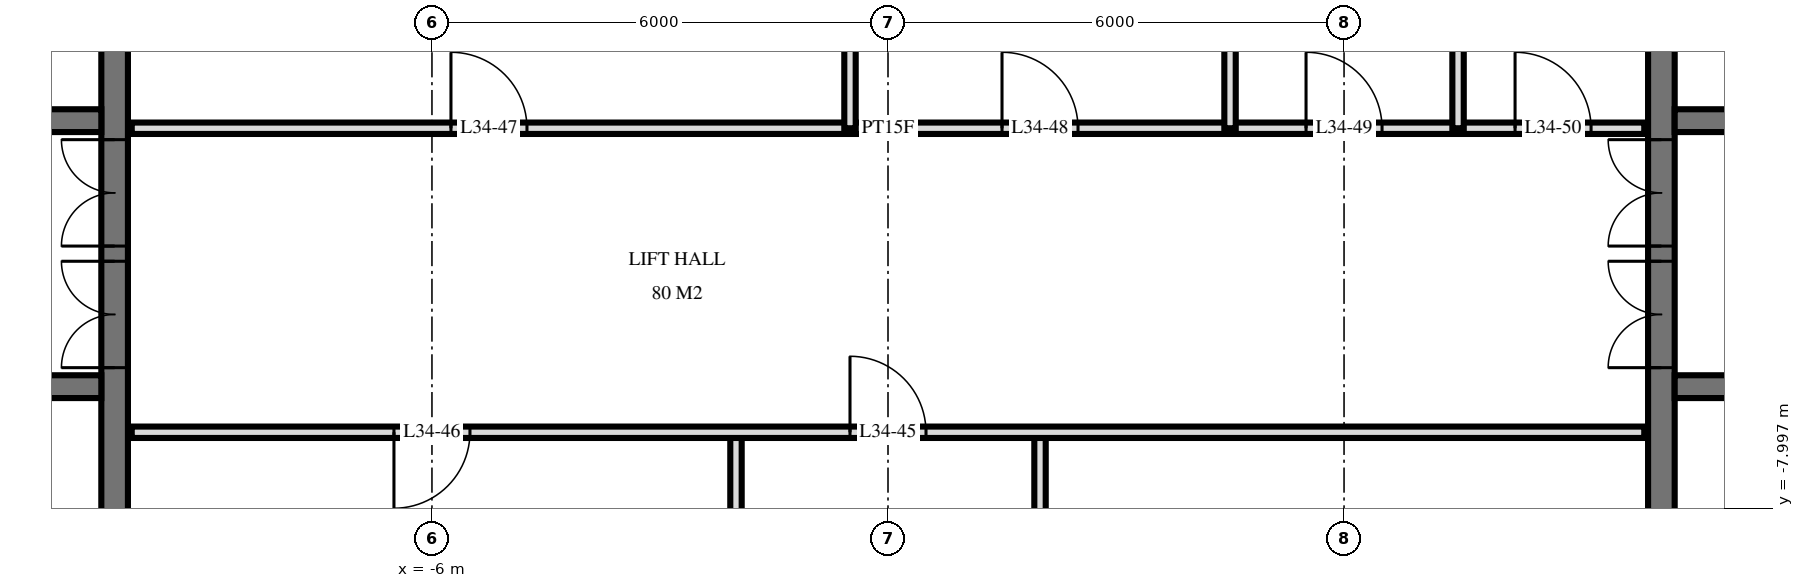
"""IFC4 building model, lengths in metres.
Left out: names, types, materials, properties, quantities, classifications, styles, units other than length and angle.
Written with IfcOpenShell. Run it as: python <this file> out.ifc"""

import sys

from ifc_helpers import new_model, si_unit, direction, frame, frame_2d, origin, place, context, subcontext, project, spatial, rectangle, extrude, element, fill, save


model = new_model("IFC4")
c1 = context("Model", 3, precision=1e-05, world=origin(), true_north=direction((0.0, 1.0)))
c2 = subcontext(c1, "Body", "Model", "MODEL_VIEW")
j1 = project(units=[si_unit("LENGTHUNIT", "METRE"), si_unit("PLANEANGLEUNIT", "RADIAN")], contexts=[c1])
p1 = place(None, origin())
s1 = spatial("IfcSite", under=j1, at=p1, CompositionType="ELEMENT")
p2 = place(p1, origin())
s2 = spatial("IfcBuilding", under=s1, at=p2, CompositionType="ELEMENT")
p3 = place(p2, frame((0.0, 0.0, 134.4)))
s3 = spatial("IfcBuildingStorey", under=s2, at=p3, CompositionType="ELEMENT", Elevation=134.4)
p4 = place(p3, frame((-10.175, -14.55, 0.0), z_axis=(0.0, 0.0, 1.0), x_axis=(0.0, 1.0, 0.0)))
e1 = element("IfcWall", 1, at=p4, inside=s3, PredefinedType="SHEAR", context=c2, shape_type="SweptSolid", body=[
    extrude(rectangle(XDim=14.1, YDim=0.35, at=frame_2d((7.05, 0.0))), origin(), (0.0, 0.0, 1.0), 3.6),
])
p5 = place(p4, frame((8.4, 0.0, 0.0)))
e2 = element("IfcOpeningElement", 2, at=p5, cuts=e1, PredefinedType="OPENING", context=c2, shape_type="SweptSolid", body=[
    extrude(rectangle(XDim=1.4, YDim=2.4, at=frame_2d((0.7, 1.2))), frame((0.0, 0.185, 0.0), z_axis=(0.0, -1.0, 0.0), x_axis=(1.0, 0.0, 0.0)), (0.0, 0.0, 1.0), 0.37),
])
p6 = place(p4, frame((10.0, 0.0, 0.0)))
e3 = element("IfcOpeningElement", 3, at=p6, cuts=e1, PredefinedType="OPENING", context=c2, shape_type="SweptSolid", body=[
    extrude(rectangle(XDim=1.4, YDim=2.4, at=frame_2d((0.7, 1.2))), frame((0.0, 0.185, 0.0), z_axis=(0.0, -1.0, 0.0), x_axis=(1.0, 0.0, 0.0)), (0.0, 0.0, 1.0), 0.37),
])
p7 = place(p4, frame((4.0, 0.0, 0.0)))
e4 = element("IfcOpeningElement", 4, at=p7, cuts=e1, PredefinedType="OPENING", context=c2, shape_type="SweptSolid", body=[
    extrude(rectangle(XDim=1.2, YDim=2.1, at=frame_2d((0.6, 1.05))), frame((0.0, 0.185, 0.0), z_axis=(0.0, -1.0, 0.0), x_axis=(1.0, 0.0, 0.0)), (0.0, 0.0, 1.0), 0.37),
])
p8 = place(p3, frame((-24.05, -2.9, 0.0), z_axis=(0.0, 0.0, 1.0), x_axis=(1.0, 0.0, 0.0)))
e5 = element("IfcWall", 5, at=p8, inside=s3, PredefinedType="SHEAR", context=c2, shape_type="SweptSolid", body=[
    extrude(rectangle(XDim=13.7, YDim=0.3, at=frame_2d((6.85, 0.0))), origin(), (0.0, 0.0, 1.0), 3.6),
])
p9 = place(p8, frame((0.55, 0.0, 0.0)))
e6 = element("IfcOpeningElement", 6, at=p9, cuts=e5, PredefinedType="OPENING", context=c2, shape_type="SweptSolid", body=[
    extrude(rectangle(XDim=1.1, YDim=2.1, at=frame_2d((0.55, 1.05))), frame((0.0, 0.16, 0.0), z_axis=(0.0, -1.0, 0.0), x_axis=(1.0, 0.0, 0.0)), (0.0, 0.0, 1.0), 0.32),
])
p10 = place(p8, frame((5.9, 0.0, 0.0)))
e7 = element("IfcOpeningElement", 7, at=p10, cuts=e5, PredefinedType="OPENING", context=c2, shape_type="SweptSolid", body=[
    extrude(rectangle(XDim=0.9, YDim=2.1, at=frame_2d((0.45, 1.05))), frame((0.0, 0.16, 0.0), z_axis=(0.0, -1.0, 0.0), x_axis=(1.0, 0.0, 0.0)), (0.0, 0.0, 1.0), 0.32),
])
p11 = place(p8, frame((11.85, 0.0, 0.0)))
e8 = element("IfcOpeningElement", 8, at=p11, cuts=e5, PredefinedType="OPENING", context=c2, shape_type="SweptSolid", body=[
    extrude(rectangle(XDim=1.0, YDim=2.1, at=frame_2d((0.5, 1.05))), frame((0.0, 0.16, 0.0), z_axis=(0.0, -1.0, 0.0), x_axis=(1.0, 0.0, 0.0)), (0.0, 0.0, 1.0), 0.32),
])
p12 = place(p8, frame((9.312, 0.0, 0.0)))
e9 = element("IfcOpeningElement", 9, at=p12, cuts=e5, PredefinedType="OPENING", context=c2, shape_type="SweptSolid", body=[
    extrude(rectangle(XDim=1.0, YDim=2.1, at=frame_2d((0.5, 1.05))), frame((0.0, 0.16, 0.0), z_axis=(0.0, -1.0, 0.0), x_axis=(1.0, 0.0, 0.0)), (0.0, 0.0, 1.0), 0.32),
])
p13 = place(p8, frame((7.887, 0.0, 0.0)))
e10 = element("IfcOpeningElement", 10, at=p13, cuts=e5, PredefinedType="OPENING", context=c2, shape_type="SweptSolid", body=[
    extrude(rectangle(XDim=1.0, YDim=2.1, at=frame_2d((0.5, 1.05))), frame((0.0, 0.16, 0.0), z_axis=(0.0, -1.0, 0.0), x_axis=(1.0, 0.0, 0.0)), (0.0, 0.0, 1.0), 0.32),
])
p14 = place(p8, frame((3.0, 0.0, 0.0)))
e11 = element("IfcOpeningElement", 11, at=p14, cuts=e5, PredefinedType="OPENING", context=c2, shape_type="SweptSolid", body=[
    extrude(rectangle(XDim=1.0, YDim=2.1, at=frame_2d((0.5, 1.05))), frame((0.0, 0.16, 0.0), z_axis=(0.0, -1.0, 0.0), x_axis=(1.0, 0.0, 0.0)), (0.0, 0.0, 1.0), 0.32),
])
p15 = place(p3, frame((-24.05, -6.4, 0.0), z_axis=(0.0, 0.0, 1.0), x_axis=(1.0, 0.0, 0.0)))
e12 = element("IfcWall", 12, at=p15, inside=s3, PredefinedType="SHEAR", context=c2, shape_type="SweptSolid", body=[
    extrude(rectangle(XDim=13.7, YDim=0.3, at=frame_2d((6.85, 0.0))), origin(), (0.0, 0.0, 1.0), 3.6),
])
p16 = place(p15, frame((0.55, 0.0, 0.0)))
e13 = element("IfcOpeningElement", 13, at=p16, cuts=e12, PredefinedType="OPENING", context=c2, shape_type="SweptSolid", body=[
    extrude(rectangle(XDim=1.1, YDim=2.1, at=frame_2d((0.55, 1.05))), frame((0.0, 0.16, 0.0), z_axis=(0.0, -1.0, 0.0), x_axis=(1.0, 0.0, 0.0)), (0.0, 0.0, 1.0), 0.32),
])
p17 = place(p15, frame((5.8, 0.0, 0.0)))
e14 = element("IfcOpeningElement", 14, at=p17, cuts=e12, PredefinedType="OPENING", context=c2, shape_type="SweptSolid", body=[
    extrude(rectangle(XDim=1.1, YDim=2.1, at=frame_2d((0.55, 1.05))), frame((0.0, 0.16, 0.0), z_axis=(0.0, -1.0, 0.0), x_axis=(1.0, 0.0, 0.0)), (0.0, 0.0, 1.0), 0.32),
])
p18 = place(p3, frame((10.175, -14.55, 0.0), z_axis=(0.0, 0.0, 1.0), x_axis=(0.0, 1.0, 0.0)))
e15 = element("IfcWall", 15, at=p18, inside=s3, PredefinedType="SHEAR", context=c2, shape_type="SweptSolid", body=[
    extrude(rectangle(XDim=14.1, YDim=0.35, at=frame_2d((7.05, 0.0))), origin(), (0.0, 0.0, 1.0), 3.6),
])
p19 = place(p18, frame((8.4, 0.0, 0.0)))
e16 = element("IfcOpeningElement", 16, at=p19, cuts=e15, PredefinedType="OPENING", context=c2, shape_type="SweptSolid", body=[
    extrude(rectangle(XDim=1.4, YDim=2.4, at=frame_2d((0.7, 1.2))), frame((0.0, 0.185, 0.0), z_axis=(0.0, -1.0, 0.0), x_axis=(1.0, 0.0, 0.0)), (0.0, 0.0, 1.0), 0.37),
])
p20 = place(p18, frame((10.0, 0.0, 0.0)))
e17 = element("IfcOpeningElement", 17, at=p20, cuts=e15, PredefinedType="OPENING", context=c2, shape_type="SweptSolid", body=[
    extrude(rectangle(XDim=1.4, YDim=2.4, at=frame_2d((0.7, 1.2))), frame((0.0, 0.185, 0.0), z_axis=(0.0, -1.0, 0.0), x_axis=(1.0, 0.0, 0.0)), (0.0, 0.0, 1.0), 0.37),
])
p21 = place(p18, frame((4.0, 0.0, 0.0)))
e18 = element("IfcOpeningElement", 18, at=p21, cuts=e15, PredefinedType="OPENING", context=c2, shape_type="SweptSolid", body=[
    extrude(rectangle(XDim=1.2, YDim=2.1, at=frame_2d((0.6, 1.05))), frame((0.0, 0.185, 0.0), z_axis=(0.0, -1.0, 0.0), x_axis=(1.0, 0.0, 0.0)), (0.0, 0.0, 1.0), 0.37),
])
p22 = place(p3, frame((10.35, -2.9, 0.0), z_axis=(0.0, 0.0, 1.0), x_axis=(1.0, 0.0, 0.0)))
e19 = element("IfcWall", 19, at=p22, inside=s3, PredefinedType="SHEAR", context=c2, shape_type="SweptSolid", body=[
    extrude(rectangle(XDim=13.7, YDim=0.3, at=frame_2d((6.85, 0.0))), origin(), (0.0, 0.0, 1.0), 3.6),
])
p23 = place(p22, frame((12.05, 0.0, 0.0)))
e20 = element("IfcOpeningElement", 20, at=p23, cuts=e19, PredefinedType="OPENING", context=c2, shape_type="SweptSolid", body=[
    extrude(rectangle(XDim=1.1, YDim=2.1, at=frame_2d((0.55, 1.05))), frame((0.0, 0.16, 0.0), z_axis=(0.0, -1.0, 0.0), x_axis=(1.0, 0.0, 0.0)), (0.0, 0.0, 1.0), 0.32),
])
p24 = place(p22, frame((6.9, 0.0, 0.0)))
e21 = element("IfcOpeningElement", 21, at=p24, cuts=e19, PredefinedType="OPENING", context=c2, shape_type="SweptSolid", body=[
    extrude(rectangle(XDim=0.9, YDim=2.1, at=frame_2d((0.45, 1.05))), frame((0.0, 0.16, 0.0), z_axis=(0.0, -1.0, 0.0), x_axis=(1.0, 0.0, 0.0)), (0.0, 0.0, 1.0), 0.32),
])
p25 = place(p22, frame((0.85, 0.0, 0.0)))
e22 = element("IfcOpeningElement", 22, at=p25, cuts=e19, PredefinedType="OPENING", context=c2, shape_type="SweptSolid", body=[
    extrude(rectangle(XDim=1.0, YDim=2.1, at=frame_2d((0.5, 1.05))), frame((0.0, 0.16, 0.0), z_axis=(0.0, -1.0, 0.0), x_axis=(1.0, 0.0, 0.0)), (0.0, 0.0, 1.0), 0.32),
])
p26 = place(p22, frame((3.387, 0.0, 0.0)))
e23 = element("IfcOpeningElement", 23, at=p26, cuts=e19, PredefinedType="OPENING", context=c2, shape_type="SweptSolid", body=[
    extrude(rectangle(XDim=1.0, YDim=2.1, at=frame_2d((0.5, 1.05))), frame((0.0, 0.16, 0.0), z_axis=(0.0, -1.0, 0.0), x_axis=(1.0, 0.0, 0.0)), (0.0, 0.0, 1.0), 0.32),
])
p27 = place(p22, frame((4.812, 0.0, 0.0)))
e24 = element("IfcOpeningElement", 24, at=p27, cuts=e19, PredefinedType="OPENING", context=c2, shape_type="SweptSolid", body=[
    extrude(rectangle(XDim=1.0, YDim=2.1, at=frame_2d((0.5, 1.05))), frame((0.0, 0.16, 0.0), z_axis=(0.0, -1.0, 0.0), x_axis=(1.0, 0.0, 0.0)), (0.0, 0.0, 1.0), 0.32),
])
p28 = place(p22, frame((9.7, 0.0, 0.0)))
e25 = element("IfcOpeningElement", 25, at=p28, cuts=e19, PredefinedType="OPENING", context=c2, shape_type="SweptSolid", body=[
    extrude(rectangle(XDim=1.0, YDim=2.1, at=frame_2d((0.5, 1.05))), frame((0.0, 0.16, 0.0), z_axis=(0.0, -1.0, 0.0), x_axis=(1.0, 0.0, 0.0)), (0.0, 0.0, 1.0), 0.32),
])
p29 = place(p3, frame((10.35, -6.4, 0.0), z_axis=(0.0, 0.0, 1.0), x_axis=(1.0, 0.0, 0.0)))
e26 = element("IfcWall", 26, at=p29, inside=s3, PredefinedType="SHEAR", context=c2, shape_type="SweptSolid", body=[
    extrude(rectangle(XDim=13.7, YDim=0.3, at=frame_2d((6.85, 0.0))), origin(), (0.0, 0.0, 1.0), 3.6),
])
p30 = place(p29, frame((12.05, 0.0, 0.0)))
e27 = element("IfcOpeningElement", 27, at=p30, cuts=e26, PredefinedType="OPENING", context=c2, shape_type="SweptSolid", body=[
    extrude(rectangle(XDim=1.1, YDim=2.1, at=frame_2d((0.55, 1.05))), frame((0.0, 0.16, 0.0), z_axis=(0.0, -1.0, 0.0), x_axis=(1.0, 0.0, 0.0)), (0.0, 0.0, 1.0), 0.32),
])
p31 = place(p29, frame((6.8, 0.0, 0.0)))
e28 = element("IfcOpeningElement", 28, at=p31, cuts=e26, PredefinedType="OPENING", context=c2, shape_type="SweptSolid", body=[
    extrude(rectangle(XDim=1.1, YDim=2.1, at=frame_2d((0.55, 1.05))), frame((0.0, 0.16, 0.0), z_axis=(0.0, -1.0, 0.0), x_axis=(1.0, 0.0, 0.0)), (0.0, 0.0, 1.0), 0.32),
])
for number, where, z_axis, x_axis in (
    (29, (7.5, -3.0, 0.0), (0.0, 0.0, 1.0), (0.0, 1.0, 0.0)),
    (30, (4.5, -3.0, 0.0), (0.0, 0.0, 1.0), (0.0, 1.0, 0.0)),
):
    element("IfcWall", number, at=place(p3, frame(where, z_axis=z_axis, x_axis=x_axis)), inside=s3, PredefinedType="PLUMBINGWALL", context=c2, shape_type="SweptSolid", body=[
        extrude(rectangle(XDim=4.02, YDim=0.15, at=frame_2d((2.01, 0.0))), origin(), (0.0, 0.0, 1.0), 3.32),
    ])
p32 = place(p3, frame((2.0, -11.0, 0.0), z_axis=(0.0, 0.0, 1.0), x_axis=(0.0, 1.0, 0.0)))
e31 = element("IfcWall", 31, at=p32, inside=s3, PredefinedType="PARTITIONING", context=c2, shape_type="SweptSolid", body=[
    extrude(rectangle(XDim=4.0, YDim=0.15, at=frame_2d((2.0, 0.0))), origin(), (0.0, 0.0, 1.0), 3.32),
])
p33 = place(p3, frame((-0.5, -3.0, 0.0), z_axis=(0.0, 0.0, 1.0), x_axis=(0.0, 1.0, 0.0)))
e32 = element("IfcWall", 32, at=p33, inside=s3, PredefinedType="PARTITIONING", context=c2, shape_type="SweptSolid", body=[
    extrude(rectangle(XDim=4.02, YDim=0.15, at=frame_2d((2.01, 0.0))), origin(), (0.0, 0.0, 1.0), 3.32),
])
p34 = place(p3, frame((-2.0, -11.0, 0.0), z_axis=(0.0, 0.0, 1.0), x_axis=(0.0, 1.0, 0.0)))
e33 = element("IfcWall", 33, at=p34, inside=s3, PredefinedType="PARTITIONING", context=c2, shape_type="SweptSolid", body=[
    extrude(rectangle(XDim=4.0, YDim=0.15, at=frame_2d((2.0, 0.0))), origin(), (0.0, 0.0, 1.0), 3.32),
])
p35 = place(p3, frame((-9.95, -7.0, 0.0), z_axis=(0.0, 0.0, 1.0), x_axis=(1.0, 0.0, 0.0)))
e34 = element("IfcWall", 34, at=p35, inside=s3, PredefinedType="PARTITIONING", context=c2, shape_type="SweptSolid", body=[
    extrude(rectangle(XDim=19.9, YDim=0.15, at=frame_2d((9.95, 0.0))), origin(), (0.0, 0.0, 1.0), 3.32),
])
p36 = place(p35, frame((9.45, 0.0, 0.0)))
e35 = element("IfcOpeningElement", 35, at=p36, cuts=e34, PredefinedType="OPENING", context=c2, shape_type="SweptSolid", body=[
    extrude(rectangle(XDim=1.0, YDim=2.1, at=frame_2d((0.5, 1.05))), frame((0.0, 0.085, 0.0), z_axis=(0.0, -1.0, 0.0), x_axis=(1.0, 0.0, 0.0)), (0.0, 0.0, 1.0), 0.17),
])
p37 = place(p35, frame((3.45, 0.0, 0.0)))
e36 = element("IfcOpeningElement", 36, at=p37, cuts=e34, PredefinedType="OPENING", context=c2, shape_type="SweptSolid", body=[
    extrude(rectangle(XDim=1.0, YDim=2.1, at=frame_2d((0.5, 1.05))), frame((0.0, 0.085, 0.0), z_axis=(0.0, -1.0, 0.0), x_axis=(1.0, 0.0, 0.0)), (0.0, 0.0, 1.0), 0.17),
])
p38 = place(p3, frame((-9.95, -3.0, 0.0), z_axis=(0.0, 0.0, 1.0), x_axis=(1.0, 0.0, 0.0)))
e37 = element("IfcWall", 37, at=p38, inside=s3, PredefinedType="PARTITIONING", context=c2, shape_type="SweptSolid", body=[
    extrude(rectangle(XDim=19.9, YDim=0.15, at=frame_2d((9.95, 0.0))), origin(), (0.0, 0.0, 1.0), 3.32),
])
p39 = place(p38, frame((4.2, 0.0, 0.0)))
e38 = element("IfcOpeningElement", 38, at=p39, cuts=e37, PredefinedType="OPENING", context=c2, shape_type="SweptSolid", body=[
    extrude(rectangle(XDim=1.0, YDim=2.1, at=frame_2d((0.5, 1.05))), frame((0.0, 0.085, 0.0), z_axis=(0.0, -1.0, 0.0), x_axis=(1.0, 0.0, 0.0)), (0.0, 0.0, 1.0), 0.17),
])
p40 = place(p38, frame((11.45, 0.0, 0.0)))
e39 = element("IfcOpeningElement", 39, at=p40, cuts=e37, PredefinedType="OPENING", context=c2, shape_type="SweptSolid", body=[
    extrude(rectangle(XDim=1.0, YDim=2.1, at=frame_2d((0.5, 1.05))), frame((0.0, 0.085, 0.0), z_axis=(0.0, -1.0, 0.0), x_axis=(1.0, 0.0, 0.0)), (0.0, 0.0, 1.0), 0.17),
])
p41 = place(p38, frame((15.45, 0.0, 0.0)))
e40 = element("IfcOpeningElement", 40, at=p41, cuts=e37, PredefinedType="OPENING", context=c2, shape_type="SweptSolid", body=[
    extrude(rectangle(XDim=1.0, YDim=2.1, at=frame_2d((0.5, 1.05))), frame((0.0, 0.085, 0.0), z_axis=(0.0, -1.0, 0.0), x_axis=(1.0, 0.0, 0.0)), (0.0, 0.0, 1.0), 0.17),
])
p42 = place(p38, frame((18.2, 0.0, 0.0)))
e41 = element("IfcOpeningElement", 41, at=p42, cuts=e37, PredefinedType="OPENING", context=c2, shape_type="SweptSolid", body=[
    extrude(rectangle(XDim=1.0, YDim=2.1, at=frame_2d((0.5, 1.05))), frame((0.0, 0.085, 0.0), z_axis=(0.0, -1.0, 0.0), x_axis=(1.0, 0.0, 0.0)), (0.0, 0.0, 1.0), 0.17),
])
p43 = place(p5, origin())
e42 = element("IfcDoor", 42, at=p43, inside=s3, OperationType="DOUBLE_DOOR_SINGLE_SWING", PredefinedType="DOOR", context=c2, shape_type="SweptSolid", body=[
    extrude(rectangle(XDim=1.4, YDim=2.4, at=frame_2d((0.7, 1.2))), frame((0.0, 0.025, 0.0), z_axis=(0.0, -1.0, 0.0), x_axis=(1.0, 0.0, 0.0)), (0.0, 0.0, 1.0), 0.05),
])
fill(e2, e42)
p44 = place(p6, origin())
e43 = element("IfcDoor", 43, at=p44, inside=s3, OperationType="DOUBLE_DOOR_SINGLE_SWING", PredefinedType="DOOR", context=c2, shape_type="SweptSolid", body=[
    extrude(rectangle(XDim=1.4, YDim=2.4, at=frame_2d((0.7, 1.2))), frame((0.0, 0.025, 0.0), z_axis=(0.0, -1.0, 0.0), x_axis=(1.0, 0.0, 0.0)), (0.0, 0.0, 1.0), 0.05),
])
fill(e3, e43)
p45 = place(p19, origin())
e44 = element("IfcDoor", 44, at=p45, inside=s3, OperationType="DOUBLE_DOOR_SINGLE_SWING", PredefinedType="DOOR", context=c2, shape_type="SweptSolid", body=[
    extrude(rectangle(XDim=1.4, YDim=2.4, at=frame_2d((0.7, 1.2))), frame((0.0, 0.025, 0.0), z_axis=(0.0, -1.0, 0.0), x_axis=(1.0, 0.0, 0.0)), (0.0, 0.0, 1.0), 0.05),
])
fill(e16, e44)
p46 = place(p20, origin())
e45 = element("IfcDoor", 45, at=p46, inside=s3, OperationType="DOUBLE_DOOR_SINGLE_SWING", PredefinedType="DOOR", context=c2, shape_type="SweptSolid", body=[
    extrude(rectangle(XDim=1.4, YDim=2.4, at=frame_2d((0.7, 1.2))), frame((0.0, 0.025, 0.0), z_axis=(0.0, -1.0, 0.0), x_axis=(1.0, 0.0, 0.0)), (0.0, 0.0, 1.0), 0.05),
])
fill(e17, e45)
p47 = place(p36, origin())
e46 = element("IfcDoor", 46, at=p47, inside=s3, OperationType="SINGLE_SWING_RIGHT", PredefinedType="DOOR", context=c2, shape_type="SweptSolid", body=[
    extrude(rectangle(XDim=1.0, YDim=2.1, at=frame_2d((0.5, 1.05))), frame((0.0, 0.025, 0.0), z_axis=(0.0, -1.0, 0.0), x_axis=(1.0, 0.0, 0.0)), (0.0, 0.0, 1.0), 0.05),
])
fill(e35, e46)
p48 = place(p37, frame((0.5, 0.0, 0.0), z_axis=(0.0, 0.0, 1.0), x_axis=(-1.0, 0.0, 0.0)))
e47 = element("IfcDoor", 47, at=p48, inside=s3, OperationType="SINGLE_SWING_LEFT", PredefinedType="DOOR", context=c2, shape_type="SweptSolid", body=[
    extrude(rectangle(XDim=1.0, YDim=2.1, at=frame_2d((0.0, 1.05))), frame((0.0, -0.025, 0.0), z_axis=(0.0, 1.0, 0.0), x_axis=(-1.0, 0.0, 0.0)), (0.0, 0.0, 1.0), 0.05),
])
fill(e36, e47)
p49 = place(p39, origin())
e48 = element("IfcDoor", 48, at=p49, inside=s3, OperationType="SINGLE_SWING_RIGHT", PredefinedType="DOOR", context=c2, shape_type="SweptSolid", body=[
    extrude(rectangle(XDim=1.0, YDim=2.1, at=frame_2d((0.5, 1.05))), frame((0.0, 0.025, 0.0), z_axis=(0.0, -1.0, 0.0), x_axis=(1.0, 0.0, 0.0)), (0.0, 0.0, 1.0), 0.05),
])
fill(e38, e48)
p50 = place(p40, origin())
e49 = element("IfcDoor", 49, at=p50, inside=s3, OperationType="SINGLE_SWING_RIGHT", PredefinedType="DOOR", context=c2, shape_type="SweptSolid", body=[
    extrude(rectangle(XDim=1.0, YDim=2.1, at=frame_2d((0.5, 1.05))), frame((0.0, 0.025, 0.0), z_axis=(0.0, -1.0, 0.0), x_axis=(1.0, 0.0, 0.0)), (0.0, 0.0, 1.0), 0.05),
])
fill(e39, e49)
p51 = place(p41, origin())
e50 = element("IfcDoor", 50, at=p51, inside=s3, OperationType="SINGLE_SWING_RIGHT", PredefinedType="DOOR", context=c2, shape_type="SweptSolid", body=[
    extrude(rectangle(XDim=1.0, YDim=2.1, at=frame_2d((0.5, 1.05))), frame((0.0, 0.025, 0.0), z_axis=(0.0, -1.0, 0.0), x_axis=(1.0, 0.0, 0.0)), (0.0, 0.0, 1.0), 0.05),
])
fill(e40, e50)
p52 = place(p42, origin())
e51 = element("IfcDoor", 51, at=p52, inside=s3, OperationType="SINGLE_SWING_RIGHT", PredefinedType="DOOR", context=c2, shape_type="SweptSolid", body=[
    extrude(rectangle(XDim=1.0, YDim=2.1, at=frame_2d((0.5, 1.05))), frame((0.0, 0.025, 0.0), z_axis=(0.0, -1.0, 0.0), x_axis=(1.0, 0.0, 0.0)), (0.0, 0.0, 1.0), 0.05),
])
fill(e41, e51)
save(model, sys.argv[1])
